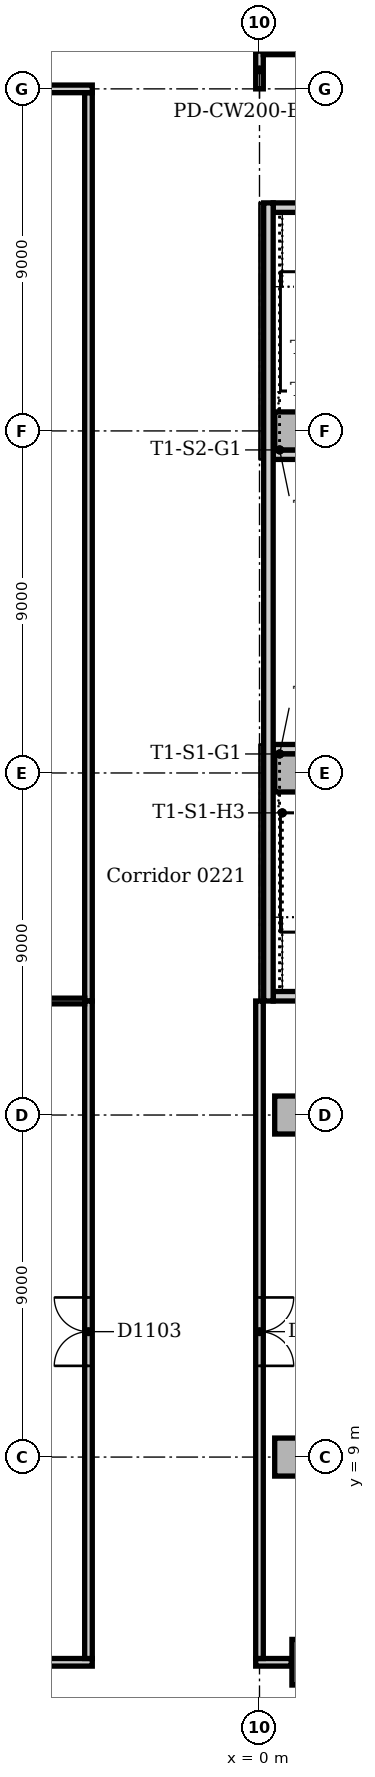
"""IFC4 building model, lengths in metres.
Left out: names, types, materials, properties, quantities, classifications, styles, units other than length and angle.
Written with IfcOpenShell. Run it as: python <this file> out.ifc"""

import sys

from ifc_helpers import new_model, si_unit, direction, frame, frame_2d, origin, origin_2d, place, context, subcontext, project, spatial, rectangle, extrude, element, fill, save


model = new_model("IFC4")
c1 = context("Model", 3, precision=1e-05, world=origin(), true_north=direction((0.0, 1.0)))
c2 = subcontext(c1, "Body", "Model", "MODEL_VIEW")
j1 = project(units=[si_unit("LENGTHUNIT", "METRE"), si_unit("PLANEANGLEUNIT", "RADIAN")], contexts=[c1])
p1 = place(None, origin())
s1 = spatial("IfcSite", under=j1, at=p1, CompositionType="ELEMENT")
p2 = place(p1, origin())
s2 = spatial("IfcBuilding", under=s1, at=p2, CompositionType="ELEMENT")
p3 = place(p2, frame((0.0, 0.0, 11.0)))
s3 = spatial("IfcBuildingStorey", under=s2, at=p3, CompositionType="ELEMENT", Elevation=11.0)
p4 = place(p3, frame((0.36, 21.125, 0.0), z_axis=(0.0, 0.0, 1.0), x_axis=(1.0, 0.0, 0.0)))
e1 = element("IfcWall", 1, at=p4, inside=s3, PredefinedType="SOLIDWALL", context=c2, shape_type="SweptSolid", body=[
    extrude(rectangle(XDim=3.54, YDim=0.25, at=frame_2d((1.77, 0.0))), origin(), (0.0, 0.0, 1.0), 5.0),
])
p5 = place(p3, frame((3.9, 27.625, 0.0), z_axis=(0.0, 0.0, 1.0), x_axis=(-1.0, 0.0, 0.0)))
e2 = element("IfcWall", 2, at=p5, inside=s3, PredefinedType="SOLIDWALL", context=c2, shape_type="SweptSolid", body=[
    extrude(rectangle(XDim=3.54, YDim=0.25, at=frame_2d((1.77, 0.0))), origin(), (0.0, 0.0, 1.0), 5.0),
])
p6 = place(p5, frame((0.4, 0.0, 0.0)))
e3 = element("IfcOpeningElement", 3, at=p6, cuts=e2, PredefinedType="OPENING", context=c2, shape_type="SweptSolid", body=[
    extrude(rectangle(XDim=1.0, YDim=2.1, at=frame_2d((0.5, 1.05))), frame((0.0, 0.135, 0.0), z_axis=(0.0, -1.0, 0.0), x_axis=(1.0, 0.0, 0.0)), (0.0, 0.0, 1.0), 0.27),
])
p7 = place(p3, frame((0.36, 35.375, 0.0), z_axis=(0.0, 0.0, 1.0), x_axis=(1.0, 0.0, 0.0)))
e4 = element("IfcWall", 4, at=p7, inside=s3, PredefinedType="SOLIDWALL", context=c2, shape_type="SweptSolid", body=[
    extrude(rectangle(XDim=3.54, YDim=0.25, at=frame_2d((1.77, 0.0))), origin(), (0.0, 0.0, 1.0), 5.0),
])
p8 = place(p7, frame((2.14, 0.0, 0.0)))
e5 = element("IfcOpeningElement", 5, at=p8, cuts=e4, PredefinedType="OPENING", context=c2, shape_type="SweptSolid", body=[
    extrude(rectangle(XDim=1.0, YDim=2.1, at=frame_2d((0.5, 1.05))), frame((0.0, 0.135, 0.0), z_axis=(0.0, -1.0, 0.0), x_axis=(1.0, 0.0, 0.0)), (0.0, 0.0, 1.0), 0.27),
])
p9 = place(p3, frame((3.9, 41.875, 0.0), z_axis=(0.0, 0.0, 1.0), x_axis=(-1.0, 0.0, 0.0)))
e6 = element("IfcWall", 6, at=p9, inside=s3, PredefinedType="SOLIDWALL", context=c2, shape_type="SweptSolid", body=[
    extrude(rectangle(XDim=3.54, YDim=0.25, at=frame_2d((1.77, 0.0))), origin(), (0.0, 0.0, 1.0), 5.0),
])
p10 = place(p3, frame((0.235, 21.0, 0.0), z_axis=(0.0, 0.0, 1.0), x_axis=(0.0, 1.0, 0.0)))
e7 = element("IfcWall", 7, at=p10, inside=s3, PredefinedType="SOLIDWALL", context=c2, shape_type="SweptSolid", body=[
    extrude(rectangle(XDim=21.0, YDim=0.25, at=frame_2d((10.5, 0.0))), origin(), (0.0, 0.0, 1.0), 5.0),
])
p11 = place(p3, frame((1.453, 3.602, 0.0), z_axis=(0.0, 0.0, 1.0), x_axis=(1.0, 0.0, 0.0)))
e8 = element("IfcColumn", 8, at=p11, inside=s3, PredefinedType="COLUMN", context=c2, shape_type="SweptSolid", body=[
    extrude(rectangle(XDim=1.2, YDim=1.2, at=origin_2d()), origin(), (0.0, 0.0, 1.0), 4.7),
])
for number, where, z_axis, x_axis in (
    (9, (0.9, 9.0, 0.0), (0.0, 0.0, 1.0), (1.0, 0.0, 0.0)),
    (10, (0.9, 18.0, 0.0), (0.0, 0.0, 1.0), (1.0, 0.0, 0.0)),
):
    element("IfcColumn", number, at=place(p3, frame(where, z_axis=z_axis, x_axis=x_axis)), inside=s3, PredefinedType="COLUMN", context=c2, shape_type="SweptSolid", body=[
        extrude(rectangle(XDim=1.0, YDim=1.0, at=origin_2d()), origin(), (0.0, 0.0, 1.0), 4.7),
    ])
for number, where, z_axis, x_axis in (
    (11, (0.9, 27.0, 0.0), (0.0, 0.0, 1.0), (1.0, 0.0, 0.0)),
    (12, (0.9, 36.0, 0.0), (0.0, 0.0, 1.0), (1.0, 0.0, 0.0)),
):
    element("IfcColumn", number, at=place(p3, frame(where, z_axis=z_axis, x_axis=x_axis)), inside=s3, PredefinedType="COLUMN", context=c2, shape_type="SweptSolid", body=[
        extrude(rectangle(XDim=1.0, YDim=1.0, at=origin_2d()), origin(), (0.0, 0.0, 1.0), 5.0),
    ])
p12 = place(p3, frame((-0.1, 3.6, 0.0), z_axis=(0.0, 0.0, 1.0), x_axis=(1.0, 0.0, 0.0)))
e13 = element("IfcWall", 13, at=p12, inside=s3, PredefinedType="PARTITIONING", context=c2, shape_type="SweptSolid", body=[
    extrude(rectangle(XDim=0.933, YDim=0.2, at=frame_2d((0.467, 0.0))), origin(), (0.0, 0.0, 1.0), 4.7),
])
p13 = place(p3, frame((0.0, 45.0, 0.0), z_axis=(0.0, 0.0, 1.0), x_axis=(0.0, 1.0, 0.0)))
e14 = element("IfcWall", 14, at=p13, inside=s3, PredefinedType="PARTITIONING", context=c2, shape_type="SweptSolid", body=[
    extrude(rectangle(XDim=1.0, YDim=0.2, at=frame_2d((0.5, 0.0))), origin(), (0.0, 0.0, 1.0), 4.7),
])
p14 = place(p3, frame((0.1, 46.0, 0.0), z_axis=(0.0, 0.0, 1.0), x_axis=(1.0, 0.0, 0.0)))
e15 = element("IfcWall", 15, at=p14, inside=s3, PredefinedType="PARTITIONING", context=c2, shape_type="SweptSolid", body=[
    extrude(rectangle(XDim=8.9, YDim=0.2, at=frame_2d((4.45, 0.0))), origin(), (0.0, 0.0, 1.0), 4.7),
])
p15 = place(p14, frame((3.9, 0.0, 0.0)))
e16 = element("IfcOpeningElement", 16, at=p15, cuts=e15, PredefinedType="OPENING", context=c2, shape_type="SweptSolid", body=[
    extrude(rectangle(XDim=1.0, YDim=2.1, at=frame_2d((0.5, 1.05))), frame((0.0, 0.11, 0.0), z_axis=(0.0, -1.0, 0.0), x_axis=(1.0, 0.0, 0.0)), (0.0, 0.0, 1.0), 0.22),
])
p16 = place(p3, frame((-18.0, 3.6, 0.0), z_axis=(0.0, 0.0, 1.0), x_axis=(1.0, 0.0, 0.0)))
e17 = element("IfcWall", 17, at=p16, inside=s3, PredefinedType="PARTITIONING", context=c2, shape_type="SweptSolid", body=[
    extrude(rectangle(XDim=13.6, YDim=0.2, at=frame_2d((6.8, 0.0))), origin(), (0.0, 0.0, 1.0), 4.7),
])
p17 = place(p3, frame((-4.5, 21.0, 0.0), z_axis=(0.0, 0.0, 1.0), x_axis=(0.0, 1.0, 0.0)))
e18 = element("IfcWall", 18, at=p17, inside=s3, PredefinedType="PARTITIONING", context=c2, shape_type="SweptSolid", body=[
    extrude(rectangle(XDim=23.9, YDim=0.2, at=frame_2d((11.95, 0.0))), origin(), (0.0, 0.0, 1.0), 4.7),
])
p18 = place(p3, frame((-4.5, 3.7, 0.0), z_axis=(0.0, 0.0, 1.0), x_axis=(0.0, 1.0, 0.0)))
e19 = element("IfcWall", 19, at=p18, inside=s3, PredefinedType="PARTITIONING", context=c2, shape_type="SweptSolid", body=[
    extrude(rectangle(XDim=17.3, YDim=0.2, at=frame_2d((8.65, 0.0))), origin(), (0.0, 0.0, 1.0), 4.7),
])
p19 = place(p18, frame((7.7, 0.0, 0.0)))
e20 = element("IfcOpeningElement", 20, at=p19, cuts=e19, PredefinedType="OPENING", context=c2, shape_type="SweptSolid", body=[
    extrude(rectangle(XDim=1.8, YDim=2.1, at=frame_2d((0.9, 1.05))), frame((0.0, 0.11, 0.0), z_axis=(0.0, -1.0, 0.0), x_axis=(1.0, 0.0, 0.0)), (0.0, 0.0, 1.0), 0.22),
])
p20 = place(p3, frame((0.0, 3.7, 0.0), z_axis=(0.0, 0.0, 1.0), x_axis=(0.0, 1.0, 0.0)))
e21 = element("IfcWall", 21, at=p20, inside=s3, PredefinedType="PARTITIONING", context=c2, shape_type="SweptSolid", body=[
    extrude(rectangle(XDim=17.3, YDim=0.2, at=frame_2d((8.65, 0.0))), origin(), (0.0, 0.0, 1.0), 4.7),
])
p21 = place(p20, frame((7.7, 0.0, 0.0)))
e22 = element("IfcOpeningElement", 22, at=p21, cuts=e21, PredefinedType="OPENING", context=c2, shape_type="SweptSolid", body=[
    extrude(rectangle(XDim=1.8, YDim=2.1, at=frame_2d((0.9, 1.05))), frame((0.0, 0.11, 0.0), z_axis=(0.0, -1.0, 0.0), x_axis=(1.0, 0.0, 0.0)), (0.0, 0.0, 1.0), 0.22),
])
p22 = place(p3, frame((-18.0, 21.0, 0.0), z_axis=(0.0, 0.0, 1.0), x_axis=(1.0, 0.0, 0.0)))
e23 = element("IfcWall", 23, at=p22, inside=s3, PredefinedType="PARTITIONING", context=c2, shape_type="SweptSolid", body=[
    extrude(rectangle(XDim=13.4, YDim=0.15, at=frame_2d((6.7, 0.0))), origin(), (0.0, 0.0, 1.0), 4.7),
])
p23 = place(p3, frame((-8.53, 45.0, 0.0), z_axis=(0.0, 0.0, 1.0), x_axis=(1.0, 0.0, 0.0)))
e24 = element("IfcWall", 24, at=p23, inside=s3, PredefinedType="PARTITIONING", context=c2, shape_type="SweptSolid", body=[
    extrude(rectangle(XDim=4.13, YDim=0.2, at=frame_2d((2.065, 0.0))), origin(), (0.0, 0.0, 1.0), 4.7),
])
for number, where, z_axis, x_axis in (
    (25, (0.48, 21.25, 0.0), (0.0, 0.0, 1.0), (0.0, 1.0, 0.0)),
    (26, (0.48, 39.795, 0.0), (0.0, 0.0, 1.0), (0.0, 1.0, 0.0)),
):
    element("IfcWall", number, at=place(p3, frame(where, z_axis=z_axis, x_axis=x_axis)), inside=s3, PredefinedType="STANDARD", context=c2, shape_type="SweptSolid", body=[
        extrude(rectangle(XDim=1.955, YDim=0.24, at=frame_2d((0.978, 0.0))), origin(), (0.0, 0.0, 1.0), 5.0),
    ])
p24 = place(p19, origin())
e27 = element("IfcDoor", 27, at=p24, inside=s3, OperationType="DOUBLE_DOOR_SINGLE_SWING", PredefinedType="DOOR", context=c2, shape_type="SweptSolid", body=[
    extrude(rectangle(XDim=1.8, YDim=2.1, at=frame_2d((0.9, 1.05))), frame((0.0, 0.025, 0.0), z_axis=(0.0, -1.0, 0.0), x_axis=(1.0, 0.0, 0.0)), (0.0, 0.0, 1.0), 0.05),
])
fill(e20, e27)
p25 = place(p21, frame((1.8, 0.0, 0.0), z_axis=(0.0, 0.0, 1.0), x_axis=(-1.0, 0.0, 0.0)))
e28 = element("IfcDoor", 28, at=p25, inside=s3, OperationType="DOUBLE_DOOR_SINGLE_SWING", PredefinedType="DOOR", context=c2, shape_type="SweptSolid", body=[
    extrude(rectangle(XDim=1.8, YDim=2.1, at=frame_2d((0.9, 1.05))), frame((0.0, 0.025, 0.0), z_axis=(0.0, -1.0, 0.0), x_axis=(1.0, 0.0, 0.0)), (0.0, 0.0, 1.0), 0.05),
])
fill(e22, e28)
save(model, sys.argv[1])
